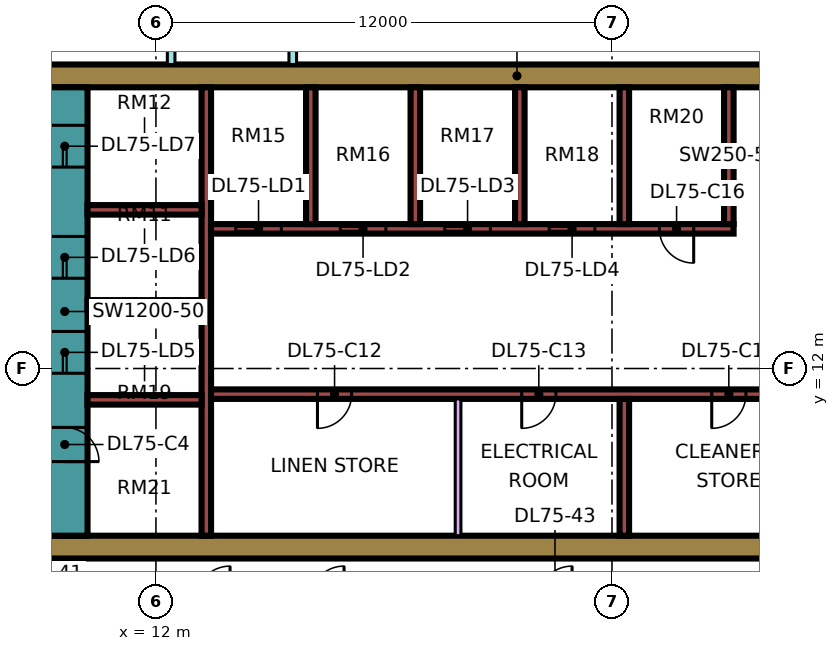
"""IFC4 building model, lengths in metres.
Left out: names, types, materials, properties, quantities, classifications, styles, units other than length and angle.
Written with IfcOpenShell. Run it as: python <this file> out.ifc"""

import sys

from ifc_helpers import new_model, si_unit, direction, frame, frame_2d, origin, place, context, subcontext, project, spatial, rectangle, extrude, element, fill, save


model = new_model("IFC4")
c1 = context("Model", 3, precision=1e-05, world=origin(), true_north=direction((0.0, 1.0)))
c2 = subcontext(c1, "Body", "Model", "MODEL_VIEW")
j1 = project(units=[si_unit("LENGTHUNIT", "METRE"), si_unit("PLANEANGLEUNIT", "RADIAN")], contexts=[c1])
p1 = place(None, origin())
s1 = spatial("IfcSite", under=j1, at=p1, CompositionType="ELEMENT")
p2 = place(p1, origin())
s2 = spatial("IfcBuilding", under=s1, at=p2, CompositionType="ELEMENT")
p3 = place(p2, frame((0.0, 0.0, 318.4)))
s3 = spatial("IfcBuildingStorey", under=s2, at=p3, CompositionType="ELEMENT", Elevation=318.4)
p4 = place(p3, frame((9.0, 7.3, 0.0), z_axis=(0.0, 0.0, 1.0), x_axis=(1.0, 0.0, 0.0)))
e1 = element("IfcWall", 1, at=p4, inside=s3, PredefinedType="SHEAR", context=c2, shape_type="SweptSolid", body=[
    extrude(rectangle(XDim=25.0, YDim=0.6, at=frame_2d((12.5, 0.0))), origin(), (0.0, 0.0, 1.0), 3.75),
])
p5 = place(p3, frame((9.0, 19.7, 0.0), z_axis=(0.0, 0.0, 1.0), x_axis=(1.0, 0.0, 0.0)))
e2 = element("IfcWall", 2, at=p5, inside=s3, PredefinedType="SHEAR", context=c2, shape_type="SweptSolid", body=[
    extrude(rectangle(XDim=25.0, YDim=0.6, at=frame_2d((12.5, 0.0))), origin(), (0.0, 0.0, 1.0), 3.75),
])
p6 = place(p5, frame((19.1, 0.0, 0.0)))
e3 = element("IfcOpeningElement", 3, at=p6, cuts=e2, PredefinedType="OPENING", context=c2, shape_type="SweptSolid", body=[
    extrude(rectangle(XDim=1.8, YDim=2.4, at=frame_2d((0.9, 1.2))), frame((0.0, 0.31, 0.0), z_axis=(0.0, -1.0, 0.0), x_axis=(1.0, 0.0, 0.0)), (0.0, 0.0, 1.0), 0.62),
])
p7 = place(p3, frame((9.6, 7.6, 0.0), z_axis=(0.0, 0.0, 1.0), x_axis=(0.0, 1.0, 0.0)))
e4 = element("IfcWall", 4, at=p7, inside=s3, PredefinedType="SHEAR", context=c2, shape_type="SweptSolid", body=[
    extrude(rectangle(XDim=11.8, YDim=1.2, at=frame_2d((5.9, 0.0))), origin(), (0.0, 0.0, 1.0), 3.75),
])
p8 = place(p7, frame((4.275, 0.0, 0.0)))
e5 = element("IfcOpeningElement", 5, at=p8, cuts=e4, PredefinedType="OPENING", context=c2, shape_type="SweptSolid", body=[
    extrude(rectangle(XDim=1.1, YDim=2.2, at=frame_2d((0.55, 1.1))), frame((0.0, 0.61, 0.0), z_axis=(0.0, -1.0, 0.0), x_axis=(1.0, 0.0, 0.0)), (0.0, 0.0, 1.0), 1.22),
])
p9 = place(p7, frame((6.775, 0.0, 0.0)))
e6 = element("IfcOpeningElement", 6, at=p9, cuts=e4, PredefinedType="OPENING", context=c2, shape_type="SweptSolid", body=[
    extrude(rectangle(XDim=1.1, YDim=2.2, at=frame_2d((0.55, 1.1))), frame((0.0, 0.61, 0.0), z_axis=(0.0, -1.0, 0.0), x_axis=(1.0, 0.0, 0.0)), (0.0, 0.0, 1.0), 1.22),
])
p10 = place(p7, frame((9.7, 0.0, 0.0)))
e7 = element("IfcOpeningElement", 7, at=p10, cuts=e4, PredefinedType="OPENING", context=c2, shape_type="SweptSolid", body=[
    extrude(rectangle(XDim=1.1, YDim=2.2, at=frame_2d((0.55, 1.1))), frame((0.0, 0.61, 0.0), z_axis=(0.0, -1.0, 0.0), x_axis=(1.0, 0.0, 0.0)), (0.0, 0.0, 1.0), 1.22),
])
p11 = place(p7, frame((1.95, 0.0, 0.0)))
e8 = element("IfcOpeningElement", 8, at=p11, cuts=e4, PredefinedType="OPENING", context=c2, shape_type="SweptSolid", body=[
    extrude(rectangle(XDim=0.9, YDim=2.1, at=frame_2d((0.45, 1.05))), frame((0.0, 0.61, 0.0), z_axis=(0.0, -1.0, 0.0), x_axis=(1.0, 0.0, 0.0)), (0.0, 0.0, 1.0), 1.22),
])
p12 = place(p3, frame((13.325, 7.6, 0.0), z_axis=(0.0, 0.0, 1.0), x_axis=(0.0, 1.0, 0.0)))
e9 = element("IfcWall", 9, at=p12, inside=s3, PredefinedType="SHEAR", context=c2, shape_type="SweptSolid", body=[
    extrude(rectangle(XDim=11.8, YDim=0.25, at=frame_2d((5.9, 0.0))), origin(), (0.0, 0.0, 1.0), 3.75),
])
p13 = place(p3, frame((13.45, 11.325, 0.0), z_axis=(0.0, 0.0, 1.0), x_axis=(1.0, 0.0, 0.0)))
e10 = element("IfcWall", 10, at=p13, inside=s3, PredefinedType="SHEAR", context=c2, shape_type="SweptSolid", body=[
    extrude(rectangle(XDim=19.95, YDim=0.25, at=frame_2d((9.975, 0.0))), origin(), (0.0, 0.0, 1.0), 3.75),
])
p14 = place(p13, frame((2.8, 0.0, 0.0)))
e11 = element("IfcOpeningElement", 11, at=p14, cuts=e10, PredefinedType="OPENING", context=c2, shape_type="SweptSolid", body=[
    extrude(rectangle(XDim=0.9, YDim=2.1, at=frame_2d((0.45, 1.05))), frame((0.0, 0.135, 0.0), z_axis=(0.0, -1.0, 0.0), x_axis=(1.0, 0.0, 0.0)), (0.0, 0.0, 1.0), 0.27),
])
p15 = place(p13, frame((8.175, 0.0, 0.0)))
e12 = element("IfcOpeningElement", 12, at=p15, cuts=e10, PredefinedType="OPENING", context=c2, shape_type="SweptSolid", body=[
    extrude(rectangle(XDim=0.9, YDim=2.1, at=frame_2d((0.45, 1.05))), frame((0.0, 0.135, 0.0), z_axis=(0.0, -1.0, 0.0), x_axis=(1.0, 0.0, 0.0)), (0.0, 0.0, 1.0), 0.27),
])
p16 = place(p13, frame((13.175, 0.0, 0.0)))
e13 = element("IfcOpeningElement", 13, at=p16, cuts=e10, PredefinedType="OPENING", context=c2, shape_type="SweptSolid", body=[
    extrude(rectangle(XDim=0.9, YDim=2.1, at=frame_2d((0.45, 1.05))), frame((0.0, 0.135, 0.0), z_axis=(0.0, -1.0, 0.0), x_axis=(1.0, 0.0, 0.0)), (0.0, 0.0, 1.0), 0.27),
])
p17 = place(p13, frame((17.65, 0.0, 0.0)))
e14 = element("IfcOpeningElement", 14, at=p17, cuts=e10, PredefinedType="OPENING", context=c2, shape_type="SweptSolid", body=[
    extrude(rectangle(XDim=0.9, YDim=2.1, at=frame_2d((0.45, 1.05))), frame((0.0, 0.135, 0.0), z_axis=(0.0, -1.0, 0.0), x_axis=(1.0, 0.0, 0.0)), (0.0, 0.0, 1.0), 0.27),
])
p18 = place(p3, frame((13.45, 15.675, 0.0), z_axis=(0.0, 0.0, 1.0), x_axis=(1.0, 0.0, 0.0)))
e15 = element("IfcWall", 15, at=p18, inside=s3, PredefinedType="SHEAR", context=c2, shape_type="SweptSolid", body=[
    extrude(rectangle(XDim=13.75, YDim=0.25, at=frame_2d((6.875, 0.0))), origin(), (0.0, 0.0, 1.0), 3.75),
])
p19 = place(p18, frame((0.65, 0.0, 0.0)))
e16 = element("IfcOpeningElement", 16, at=p19, cuts=e15, PredefinedType="OPENING", context=c2, shape_type="SweptSolid", body=[
    extrude(rectangle(XDim=1.2, YDim=2.2, at=frame_2d((0.6, 1.1))), frame((0.0, 0.135, 0.0), z_axis=(0.0, -1.0, 0.0), x_axis=(1.0, 0.0, 0.0)), (0.0, 0.0, 1.0), 0.27),
])
p20 = place(p18, frame((3.4, 0.0, 0.0)))
e17 = element("IfcOpeningElement", 17, at=p20, cuts=e15, PredefinedType="OPENING", context=c2, shape_type="SweptSolid", body=[
    extrude(rectangle(XDim=1.2, YDim=2.2, at=frame_2d((0.6, 1.1))), frame((0.0, 0.135, 0.0), z_axis=(0.0, -1.0, 0.0), x_axis=(1.0, 0.0, 0.0)), (0.0, 0.0, 1.0), 0.27),
])
p21 = place(p18, frame((6.15, 0.0, 0.0)))
e18 = element("IfcOpeningElement", 18, at=p21, cuts=e15, PredefinedType="OPENING", context=c2, shape_type="SweptSolid", body=[
    extrude(rectangle(XDim=1.2, YDim=2.2, at=frame_2d((0.6, 1.1))), frame((0.0, 0.135, 0.0), z_axis=(0.0, -1.0, 0.0), x_axis=(1.0, 0.0, 0.0)), (0.0, 0.0, 1.0), 0.27),
])
p22 = place(p18, frame((8.9, 0.0, 0.0)))
e19 = element("IfcOpeningElement", 19, at=p22, cuts=e15, PredefinedType="OPENING", context=c2, shape_type="SweptSolid", body=[
    extrude(rectangle(XDim=1.2, YDim=2.2, at=frame_2d((0.6, 1.1))), frame((0.0, 0.135, 0.0), z_axis=(0.0, -1.0, 0.0), x_axis=(1.0, 0.0, 0.0)), (0.0, 0.0, 1.0), 0.27),
])
p23 = place(p18, frame((11.8, 0.0, 0.0)))
e20 = element("IfcOpeningElement", 20, at=p23, cuts=e15, PredefinedType="OPENING", context=c2, shape_type="SweptSolid", body=[
    extrude(rectangle(XDim=0.9, YDim=2.1, at=frame_2d((0.45, 1.05))), frame((0.0, 0.135, 0.0), z_axis=(0.0, -1.0, 0.0), x_axis=(1.0, 0.0, 0.0)), (0.0, 0.0, 1.0), 0.27),
])
for number, where, z_axis, x_axis in (
    (21, (10.2, 11.175, 0.0), (0.0, 0.0, 1.0), (1.0, 0.0, 0.0)),
    (22, (10.2, 13.675, 0.0), (0.0, 0.0, 1.0), (1.0, 0.0, 0.0)),
    (23, (10.2, 16.175, 0.0), (0.0, 0.0, 1.0), (1.0, 0.0, 0.0)),
):
    element("IfcWall", number, at=place(p3, frame(where, z_axis=z_axis, x_axis=x_axis)), inside=s3, PredefinedType="SHEAR", context=c2, shape_type="SweptSolid", body=[
        extrude(rectangle(XDim=3.0, YDim=0.25, at=frame_2d((1.5, 0.0))), origin(), (0.0, 0.0, 1.0), 3.75),
    ])
for number, where, z_axis, x_axis in (
    (24, (24.325, 7.6, 0.0), (0.0, 0.0, 1.0), (0.0, 1.0, 0.0)),
    (25, (16.075, 15.8, 0.0), (0.0, 0.0, 1.0), (0.0, 1.0, 0.0)),
    (26, (18.825, 15.8, 0.0), (0.0, 0.0, 1.0), (0.0, 1.0, 0.0)),
    (27, (21.575, 15.8, 0.0), (0.0, 0.0, 1.0), (0.0, 1.0, 0.0)),
    (28, (24.325, 15.8, 0.0), (0.0, 0.0, 1.0), (0.0, 1.0, 0.0)),
    (29, (27.075, 15.8, 0.0), (0.0, 0.0, 1.0), (0.0, 1.0, 0.0)),
):
    element("IfcWall", number, at=place(p3, frame(where, z_axis=z_axis, x_axis=x_axis)), inside=s3, PredefinedType="SHEAR", context=c2, shape_type="SweptSolid", body=[
        extrude(rectangle(XDim=3.6, YDim=0.25, at=frame_2d((1.8, 0.0))), origin(), (0.0, 0.0, 1.0), 3.75),
    ])
p24 = place(p3, frame((-1.447, 12.553, 0.0), z_axis=(0.0, 0.0, 1.0), x_axis=(0.707106781187, -0.707106781187, 0.0)))
e30 = element("IfcWall", 30, at=p24, inside=s3, PredefinedType="SOLIDWALL", context=c2, shape_type="SweptSolid", body=[
    extrude(rectangle(XDim=19.799, YDim=0.15, at=frame_2d((9.899, 0.0))), origin(), (0.0, 0.0, 1.0), 3.3),
])
p25 = place(p24, frame((2.212, 0.0, 0.45)))
e31 = element("IfcOpeningElement", 31, at=p25, cuts=e30, PredefinedType="OPENING", context=c2, shape_type="SweptSolid", body=[
    extrude(rectangle(XDim=3.0, YDim=2.4, at=frame_2d((1.5, 1.2))), frame((0.0, 0.085, 0.0), z_axis=(0.0, -1.0, 0.0), x_axis=(1.0, 0.0, 0.0)), (0.0, 0.0, 1.0), 0.17),
])
p26 = place(p24, frame((10.216, 0.0, 0.45)))
e32 = element("IfcOpeningElement", 32, at=p26, cuts=e30, PredefinedType="OPENING", context=c2, shape_type="SweptSolid", body=[
    extrude(rectangle(XDim=3.0, YDim=2.4, at=frame_2d((1.5, 1.2))), frame((0.0, 0.085, 0.0), z_axis=(0.0, -1.0, 0.0), x_axis=(1.0, 0.0, 0.0)), (0.0, 0.0, 1.0), 0.17),
])
p27 = place(p3, frame((19.95, 7.6, 0.0), z_axis=(0.0, 0.0, 1.0), x_axis=(0.0, 1.0, 0.0)))
e33 = element("IfcWall", 33, at=p27, inside=s3, PredefinedType="PARTITIONING", context=c2, shape_type="SweptSolid", body=[
    extrude(rectangle(XDim=3.6, YDim=0.15, at=frame_2d((1.8, 0.0))), origin(), (0.0, 0.0, 1.0), 3.3),
])
p28 = place(p3, frame((12.4, 20.0, 0.0), z_axis=(0.0, 0.0, 1.0), x_axis=(0.0, 1.0, 0.0)))
e34 = element("IfcWall", 34, at=p28, inside=s3, PredefinedType="PARTITIONING", context=c2, shape_type="SweptSolid", body=[
    extrude(rectangle(XDim=33.926, YDim=0.2, at=frame_2d((16.963, 0.0))), origin(), (0.0, 0.0, 1.0), 3.3),
])
p29 = place(p28, frame((31.8, 0.0, 0.0)))
e35 = element("IfcOpeningElement", 35, at=p29, cuts=e34, PredefinedType="OPENING", context=c2, shape_type="SweptSolid", body=[
    extrude(rectangle(XDim=1.0, YDim=2.1, at=frame_2d((0.5, 1.05))), frame((0.0, 0.11, 0.0), z_axis=(0.0, -1.0, 0.0), x_axis=(1.0, 0.0, 0.0)), (0.0, 0.0, 1.0), 0.22),
])
p30 = place(p28, frame((0.6, 0.0, 0.0)))
e36 = element("IfcOpeningElement", 36, at=p30, cuts=e34, PredefinedType="OPENING", context=c2, shape_type="SweptSolid", body=[
    extrude(rectangle(XDim=1.2, YDim=2.1, at=frame_2d((0.6, 1.05))), frame((0.0, 0.11, 0.0), z_axis=(0.0, -1.0, 0.0), x_axis=(1.0, 0.0, 0.0)), (0.0, 0.0, 1.0), 0.22),
])
p31 = place(p28, frame((4.5, 0.0, 0.0)))
e37 = element("IfcOpeningElement", 37, at=p31, cuts=e34, PredefinedType="OPENING", context=c2, shape_type="SweptSolid", body=[
    extrude(rectangle(XDim=1.0, YDim=2.1, at=frame_2d((0.5, 1.05))), frame((0.0, 0.11, 0.0), z_axis=(0.0, -1.0, 0.0), x_axis=(1.0, 0.0, 0.0)), (0.0, 0.0, 1.0), 0.22),
])
p32 = place(p3, frame((15.6, 20.0, 0.0), z_axis=(0.0, 0.0, 1.0), x_axis=(0.0, 1.0, 0.0)))
e38 = element("IfcWall", 38, at=p32, inside=s3, PredefinedType="PARTITIONING", context=c2, shape_type="SweptSolid", body=[
    extrude(rectangle(XDim=27.775, YDim=0.2, at=frame_2d((13.887, 0.0))), origin(), (0.0, 0.0, 1.0), 3.3),
])
p33 = place(p32, frame((6.7, 0.0, 0.0)))
e39 = element("IfcOpeningElement", 39, at=p33, cuts=e38, PredefinedType="OPENING", context=c2, shape_type="SweptSolid", body=[
    extrude(rectangle(XDim=1.6, YDim=2.1, at=frame_2d((0.8, 1.05))), frame((0.0, 0.11, 0.0), z_axis=(0.0, -1.0, 0.0), x_axis=(1.0, 0.0, 0.0)), (0.0, 0.0, 1.0), 0.22),
])
p34 = place(p32, frame((12.95, 0.0, 0.0)))
e40 = element("IfcOpeningElement", 40, at=p34, cuts=e38, PredefinedType="OPENING", context=c2, shape_type="SweptSolid", body=[
    extrude(rectangle(XDim=1.0, YDim=2.1, at=frame_2d((0.5, 1.05))), frame((0.0, 0.11, 0.0), z_axis=(0.0, -1.0, 0.0), x_axis=(1.0, 0.0, 0.0)), (0.0, 0.0, 1.0), 0.22),
])
p35 = place(p32, frame((16.75, 0.0, 0.0)))
e41 = element("IfcOpeningElement", 41, at=p35, cuts=e38, PredefinedType="OPENING", context=c2, shape_type="SweptSolid", body=[
    extrude(rectangle(XDim=1.0, YDim=2.1, at=frame_2d((0.5, 1.05))), frame((0.0, 0.11, 0.0), z_axis=(0.0, -1.0, 0.0), x_axis=(1.0, 0.0, 0.0)), (0.0, 0.0, 1.0), 0.22),
])
p36 = place(p32, frame((1.15, 0.0, 0.0)))
e42 = element("IfcOpeningElement", 42, at=p36, cuts=e38, PredefinedType="OPENING", context=c2, shape_type="SweptSolid", body=[
    extrude(rectangle(XDim=1.8, YDim=2.1, at=frame_2d((0.9, 1.05))), frame((0.0, 0.11, 0.0), z_axis=(0.0, -1.0, 0.0), x_axis=(1.0, 0.0, 0.0)), (0.0, 0.0, 1.0), 0.22),
])
p37 = place(p32, frame((25.9, 0.0, 0.0)))
e43 = element("IfcOpeningElement", 43, at=p37, cuts=e38, PredefinedType="OPENING", context=c2, shape_type="SweptSolid", body=[
    extrude(rectangle(XDim=1.0, YDim=2.1, at=frame_2d((0.5, 1.05))), frame((0.0, 0.11, 0.0), z_axis=(0.0, -1.0, 0.0), x_axis=(1.0, 0.0, 0.0)), (0.0, 0.0, 1.0), 0.22),
])
p38 = place(p19, origin())
e44 = element("IfcDoor", 44, at=p38, inside=s3, OperationType="DOUBLE_DOOR_SLIDING", PredefinedType="DOOR", context=c2, shape_type="SweptSolid", body=[
    extrude(rectangle(XDim=1.2, YDim=2.2, at=frame_2d((0.6, 1.1))), frame((0.0, 0.025, 0.0), z_axis=(0.0, -1.0, 0.0), x_axis=(1.0, 0.0, 0.0)), (0.0, 0.0, 1.0), 0.05),
])
fill(e16, e44)
p39 = place(p20, origin())
e45 = element("IfcDoor", 45, at=p39, inside=s3, OperationType="DOUBLE_DOOR_SLIDING", PredefinedType="DOOR", context=c2, shape_type="SweptSolid", body=[
    extrude(rectangle(XDim=1.2, YDim=2.2, at=frame_2d((0.6, 1.1))), frame((0.0, 0.025, 0.0), z_axis=(0.0, -1.0, 0.0), x_axis=(1.0, 0.0, 0.0)), (0.0, 0.0, 1.0), 0.05),
])
fill(e17, e45)
p40 = place(p21, origin())
e46 = element("IfcDoor", 46, at=p40, inside=s3, OperationType="DOUBLE_DOOR_SLIDING", PredefinedType="DOOR", context=c2, shape_type="SweptSolid", body=[
    extrude(rectangle(XDim=1.2, YDim=2.2, at=frame_2d((0.6, 1.1))), frame((0.0, 0.025, 0.0), z_axis=(0.0, -1.0, 0.0), x_axis=(1.0, 0.0, 0.0)), (0.0, 0.0, 1.0), 0.05),
])
fill(e18, e46)
p41 = place(p22, origin())
e47 = element("IfcDoor", 47, at=p41, inside=s3, OperationType="DOUBLE_DOOR_SLIDING", PredefinedType="DOOR", context=c2, shape_type="SweptSolid", body=[
    extrude(rectangle(XDim=1.2, YDim=2.2, at=frame_2d((0.6, 1.1))), frame((0.0, 0.025, 0.0), z_axis=(0.0, -1.0, 0.0), x_axis=(1.0, 0.0, 0.0)), (0.0, 0.0, 1.0), 0.05),
])
fill(e19, e47)
p42 = place(p8, origin())
e48 = element("IfcDoor", 48, at=p42, inside=s3, OperationType="DOUBLE_DOOR_SLIDING", PredefinedType="DOOR", context=c2, shape_type="SweptSolid", body=[
    extrude(rectangle(XDim=1.1, YDim=2.2, at=frame_2d((0.55, 1.1))), frame((0.0, 0.025, 0.0), z_axis=(0.0, -1.0, 0.0), x_axis=(1.0, 0.0, 0.0)), (0.0, 0.0, 1.0), 0.05),
])
fill(e5, e48)
p43 = place(p9, origin())
e49 = element("IfcDoor", 49, at=p43, inside=s3, OperationType="DOUBLE_DOOR_SLIDING", PredefinedType="DOOR", context=c2, shape_type="SweptSolid", body=[
    extrude(rectangle(XDim=1.1, YDim=2.2, at=frame_2d((0.55, 1.1))), frame((0.0, 0.025, 0.0), z_axis=(0.0, -1.0, 0.0), x_axis=(1.0, 0.0, 0.0)), (0.0, 0.0, 1.0), 0.05),
])
fill(e6, e49)
p44 = place(p10, origin())
e50 = element("IfcDoor", 50, at=p44, inside=s3, OperationType="DOUBLE_DOOR_SLIDING", PredefinedType="DOOR", context=c2, shape_type="SweptSolid", body=[
    extrude(rectangle(XDim=1.1, YDim=2.2, at=frame_2d((0.55, 1.1))), frame((0.0, 0.025, 0.0), z_axis=(0.0, -1.0, 0.0), x_axis=(1.0, 0.0, 0.0)), (0.0, 0.0, 1.0), 0.05),
])
fill(e7, e50)
p45 = place(p11, frame((0.9, 0.0, 0.0), z_axis=(0.0, 0.0, 1.0), x_axis=(-1.0, 0.0, 0.0)))
e51 = element("IfcDoor", 51, at=p45, inside=s3, OperationType="SINGLE_SWING_LEFT", PredefinedType="DOOR", context=c2, shape_type="SweptSolid", body=[
    extrude(rectangle(XDim=0.9, YDim=2.1, at=frame_2d((0.45, 1.05))), frame((0.0, 0.025, 0.0), z_axis=(0.0, -1.0, 0.0), x_axis=(1.0, 0.0, 0.0)), (0.0, 0.0, 1.0), 0.05),
])
fill(e8, e51)
p46 = place(p14, frame((0.9, 0.0, 0.0), z_axis=(0.0, 0.0, 1.0), x_axis=(-1.0, 0.0, 0.0)))
e52 = element("IfcDoor", 52, at=p46, inside=s3, OperationType="SINGLE_SWING_LEFT", PredefinedType="DOOR", context=c2, shape_type="SweptSolid", body=[
    extrude(rectangle(XDim=0.9, YDim=2.1, at=frame_2d((0.45, 1.05))), frame((0.0, 0.025, 0.0), z_axis=(0.0, -1.0, 0.0), x_axis=(1.0, 0.0, 0.0)), (0.0, 0.0, 1.0), 0.05),
])
fill(e11, e52)
p47 = place(p15, frame((0.9, 0.0, 0.0), z_axis=(0.0, 0.0, 1.0), x_axis=(-1.0, 0.0, 0.0)))
e53 = element("IfcDoor", 53, at=p47, inside=s3, OperationType="SINGLE_SWING_LEFT", PredefinedType="DOOR", context=c2, shape_type="SweptSolid", body=[
    extrude(rectangle(XDim=0.9, YDim=2.1, at=frame_2d((0.45, 1.05))), frame((0.0, 0.025, 0.0), z_axis=(0.0, -1.0, 0.0), x_axis=(1.0, 0.0, 0.0)), (0.0, 0.0, 1.0), 0.05),
])
fill(e12, e53)
p48 = place(p16, frame((0.9, 0.0, 0.0), z_axis=(0.0, 0.0, 1.0), x_axis=(-1.0, 0.0, 0.0)))
e54 = element("IfcDoor", 54, at=p48, inside=s3, OperationType="SINGLE_SWING_LEFT", PredefinedType="DOOR", context=c2, shape_type="SweptSolid", body=[
    extrude(rectangle(XDim=0.9, YDim=2.1, at=frame_2d((0.45, 1.05))), frame((0.0, 0.025, 0.0), z_axis=(0.0, -1.0, 0.0), x_axis=(1.0, 0.0, 0.0)), (0.0, 0.0, 1.0), 0.05),
])
fill(e13, e54)
p49 = place(p23, origin())
e55 = element("IfcDoor", 55, at=p49, inside=s3, OperationType="SINGLE_SWING_RIGHT", PredefinedType="DOOR", context=c2, shape_type="SweptSolid", body=[
    extrude(rectangle(XDim=0.9, YDim=2.1, at=frame_2d((0.45, 1.05))), frame((0.0, 0.025, 0.0), z_axis=(0.0, -1.0, 0.0), x_axis=(1.0, 0.0, 0.0)), (0.0, 0.0, 1.0), 0.05),
])
fill(e20, e55)
save(model, sys.argv[1])
